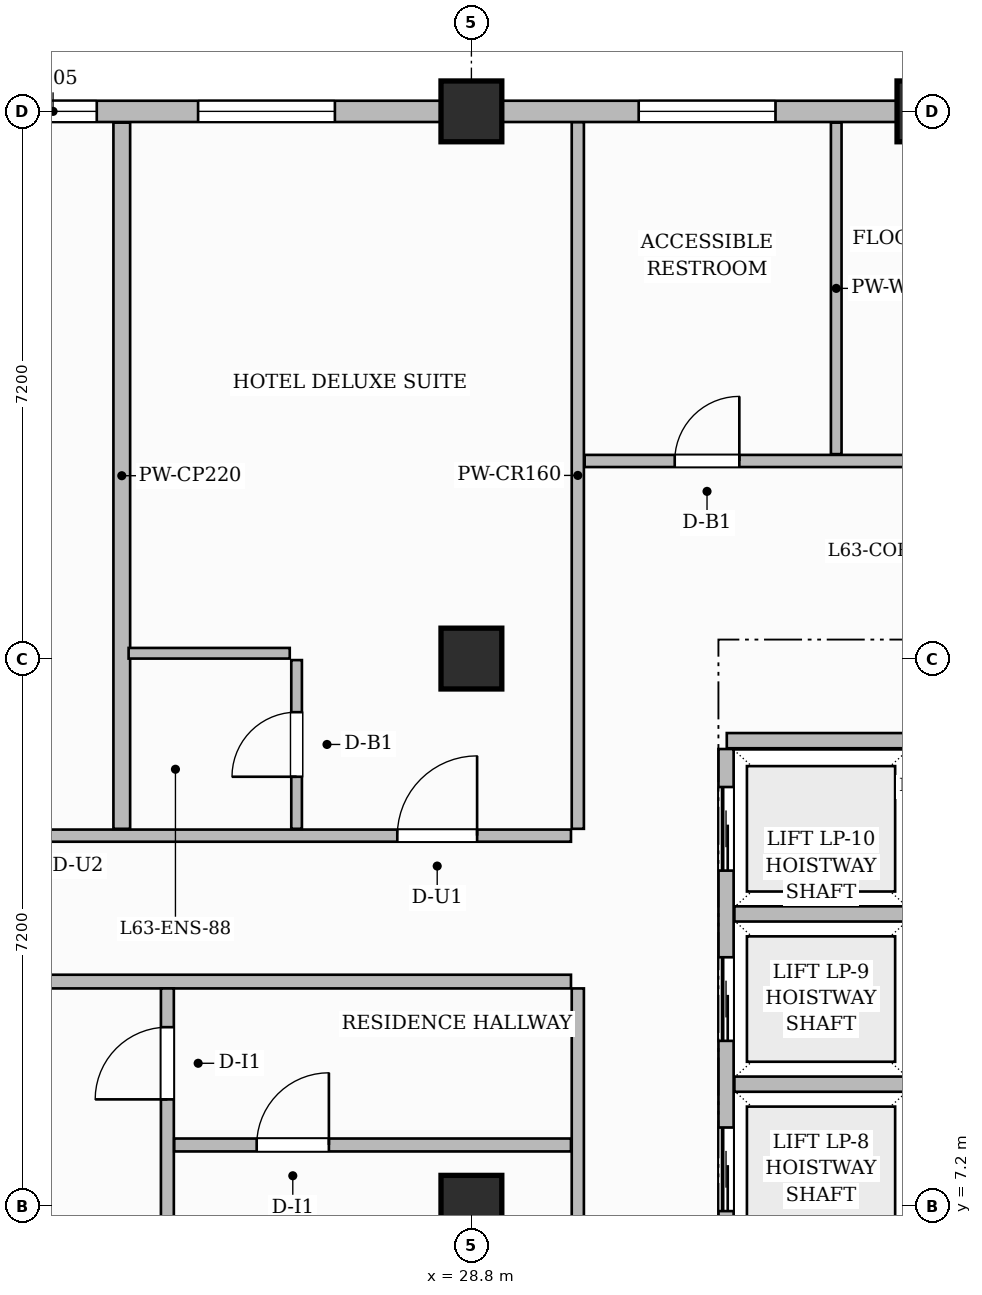
"""IFC4 building model, lengths in metres.
Left out: names, types, materials, properties, quantities, classifications, styles, units other than length and angle.
Written with IfcOpenShell. Run it as: python <this file> out.ifc"""

import sys

from ifc_helpers import new_model, si_unit, direction, frame, frame_2d, origin, origin_2d, place, context, subcontext, project, spatial, rectangle, extrude, source, transform, mapped, element, fill, save


model = new_model("IFC4")
c1 = context("Model", 3, precision=1e-05, world=origin(), true_north=direction((0.0, 1.0)))
c2 = subcontext(c1, "Body", "Model", "MODEL_VIEW")
j1 = project(units=[si_unit("LENGTHUNIT", "METRE"), si_unit("PLANEANGLEUNIT", "RADIAN")], contexts=[c1])
p1 = place(None, origin())
s1 = spatial("IfcSite", under=j1, at=p1, CompositionType="ELEMENT")
p2 = place(p1, origin())
s2 = spatial("IfcBuilding", under=s1, at=p2, CompositionType="ELEMENT")
p3 = place(p2, frame((0.0, 0.0, 251.95)))
s3 = spatial("IfcBuildingStorey", under=s2, at=p3, CompositionType="ELEMENT", Elevation=251.95)
m1 = source(origin(), c2, "Body", "SweptSolid", [
    extrude(rectangle(XDim=0.8, YDim=0.8, at=origin_2d()), origin(), (0.0, 0.0, 1.0), 3.85),
])
for number, where, z_axis, x_axis in (
    (1, (28.8, 7.2, 0.0), (0.0, 0.0, 1.0), (1.0, 0.0, 0.0)),
    (2, (28.8, 14.4, 0.0), (0.0, 0.0, 1.0), (1.0, 0.0, 0.0)),
    (3, (28.8, 21.6, 0.0), (0.0, 0.0, 1.0), (1.0, 0.0, 0.0)),
    (4, (34.8, 21.6, 0.0), (0.0, 0.0, 1.0), (1.0, 0.0, 0.0)),
):
    element("IfcColumn", number, at=place(p3, frame(where, z_axis=z_axis, x_axis=x_axis)), inside=s3, PredefinedType="COLUMN", context=c2, shape_type="MappedRepresentation", body=[
        mapped(m1, transform((0.0, 0.0, 0.0), scale=1.0)),
    ])
p4 = place(p3, frame((32.16, 13.32, 0.0), z_axis=(0.0, 0.0, 1.0), x_axis=(1.0, 0.0, 0.0)))
e5 = element("IfcWall", 5, at=p4, inside=s3, PredefinedType="PARTITIONING", context=c2, shape_type="SweptSolid", body=[
    extrude(rectangle(XDim=2.385, YDim=0.2, at=frame_2d((1.192, 0.0))), origin(), (0.0, 0.0, 1.0), 3.6),
])
p5 = place(p3, frame((32.15, 4.39, 0.0), z_axis=(0.0, 0.0, 1.0), x_axis=(0.0, 1.0, 0.0)))
e6 = element("IfcWall", 6, at=p5, inside=s3, PredefinedType="PARTITIONING", context=c2, shape_type="SweptSolid", body=[
    extrude(rectangle(XDim=8.82, YDim=0.2, at=frame_2d((4.41, 0.0))), origin(), (0.0, 0.0, 1.0), 3.6),
])
p6 = place(p5, frame((0.5, 0.0, 0.0)))
e7 = element("IfcOpeningElement", 7, at=p6, cuts=e6, PredefinedType="OPENING", context=c2, shape_type="SweptSolid", body=[
    extrude(rectangle(XDim=1.1, YDim=2.2, at=frame_2d((0.55, 1.1))), frame((0.0, 0.11, 0.0), z_axis=(0.0, -1.0, 0.0), x_axis=(1.0, 0.0, 0.0)), (0.0, 0.0, 1.0), 0.22),
])
p7 = place(p5, frame((2.74, 0.0, 0.0)))
e8 = element("IfcOpeningElement", 8, at=p7, cuts=e6, PredefinedType="OPENING", context=c2, shape_type="SweptSolid", body=[
    extrude(rectangle(XDim=1.1, YDim=2.2, at=frame_2d((0.55, 1.1))), frame((0.0, 0.11, 0.0), z_axis=(0.0, -1.0, 0.0), x_axis=(1.0, 0.0, 0.0)), (0.0, 0.0, 1.0), 0.22),
])
p8 = place(p5, frame((4.98, 0.0, 0.0)))
e9 = element("IfcOpeningElement", 9, at=p8, cuts=e6, PredefinedType="OPENING", context=c2, shape_type="SweptSolid", body=[
    extrude(rectangle(XDim=1.1, YDim=2.2, at=frame_2d((0.55, 1.1))), frame((0.0, 0.11, 0.0), z_axis=(0.0, -1.0, 0.0), x_axis=(1.0, 0.0, 0.0)), (0.0, 0.0, 1.0), 0.22),
])
p9 = place(p5, frame((7.22, 0.0, 0.0)))
e10 = element("IfcOpeningElement", 10, at=p9, cuts=e6, PredefinedType="OPENING", context=c2, shape_type="SweptSolid", body=[
    extrude(rectangle(XDim=1.1, YDim=2.2, at=frame_2d((0.55, 1.1))), frame((0.0, 0.11, 0.0), z_axis=(0.0, -1.0, 0.0), x_axis=(1.0, 0.0, 0.0)), (0.0, 0.0, 1.0), 0.22),
])
for number, where, z_axis, x_axis in (
    (11, (32.26, 8.8, 0.0), (0.0, 0.0, 1.0), (1.0, 0.0, 0.0)),
    (12, (32.26, 11.04, 0.0), (0.0, 0.0, 1.0), (1.0, 0.0, 0.0)),
):
    element("IfcWall", number, at=place(p3, frame(where, z_axis=z_axis, x_axis=x_axis)), inside=s3, PredefinedType="PARTITIONING", context=c2, shape_type="SweptSolid", body=[
        extrude(rectangle(XDim=2.255, YDim=0.2, at=frame_2d((1.127, 0.0))), origin(), (0.0, 0.0, 1.0), 3.6),
    ])
p10 = place(p3, frame((18.148, 10.15, 0.0), z_axis=(0.0, 0.0, 1.0), x_axis=(1.0, 0.0, 0.0)))
e13 = element("IfcWall", 13, at=p10, inside=s3, PredefinedType="PARTITIONING", context=c2, shape_type="SweptSolid", body=[
    extrude(rectangle(XDim=11.962, YDim=0.18, at=frame_2d((5.981, 0.0))), origin(), (0.0, 0.0, 1.0), 3.6),
])
p11 = place(p10, frame((3.942, 0.0, 0.0)))
e14 = element("IfcOpeningElement", 14, at=p11, cuts=e13, PredefinedType="OPENING", context=c2, shape_type="SweptSolid", body=[
    extrude(rectangle(XDim=1.05, YDim=2.25, at=frame_2d((0.525, 1.125))), frame((0.0, 0.1, 0.0), z_axis=(0.0, -1.0, 0.0), x_axis=(1.0, 0.0, 0.0)), (0.0, 0.0, 1.0), 0.2),
])
p12 = place(p3, frame((18.148, 12.07, 0.0), z_axis=(0.0, 0.0, 1.0), x_axis=(1.0, 0.0, 0.0)))
e15 = element("IfcWall", 15, at=p12, inside=s3, PredefinedType="PARTITIONING", context=c2, shape_type="SweptSolid", body=[
    extrude(rectangle(XDim=11.962, YDim=0.16, at=frame_2d((5.981, 0.0))), origin(), (0.0, 0.0, 1.0), 3.6),
])
p13 = place(p12, frame((3.677, 0.0, 0.0)))
e16 = element("IfcOpeningElement", 16, at=p13, cuts=e15, PredefinedType="OPENING", context=c2, shape_type="SweptSolid", body=[
    extrude(rectangle(XDim=1.0, YDim=2.2, at=frame_2d((0.5, 1.1))), frame((0.0, 0.09, 0.0), z_axis=(0.0, -1.0, 0.0), x_axis=(1.0, 0.0, 0.0)), (0.0, 0.0, 1.0), 0.18),
])
p14 = place(p12, frame((9.677, 0.0, 0.0)))
e17 = element("IfcOpeningElement", 17, at=p14, cuts=e15, PredefinedType="OPENING", context=c2, shape_type="SweptSolid", body=[
    extrude(rectangle(XDim=1.05, YDim=2.25, at=frame_2d((0.525, 1.125))), frame((0.0, 0.09, 0.0), z_axis=(0.0, -1.0, 0.0), x_axis=(1.0, 0.0, 0.0)), (0.0, 0.0, 1.0), 0.18),
])
p15 = place(p3, frame((30.2, 12.16, 0.0), z_axis=(0.0, 0.0, 1.0), x_axis=(0.0, 1.0, 0.0)))
e18 = element("IfcWall", 18, at=p15, inside=s3, PredefinedType="PARTITIONING", context=c2, shape_type="SweptSolid", body=[
    extrude(rectangle(XDim=9.3, YDim=0.16, at=frame_2d((4.65, 0.0))), origin(), (0.0, 0.0, 1.0), 3.6),
])
p16 = place(p3, frame((30.29, 17.0, 0.0), z_axis=(0.0, 0.0, 1.0), x_axis=(1.0, 0.0, 0.0)))
e19 = element("IfcWall", 19, at=p16, inside=s3, PredefinedType="PARTITIONING", context=c2, shape_type="SweptSolid", body=[
    extrude(rectangle(XDim=19.37, YDim=0.16, at=frame_2d((9.685, 0.0))), origin(), (0.0, 0.0, 1.0), 3.6),
])
p17 = place(p16, frame((1.185, 0.0, 0.0)))
e20 = element("IfcOpeningElement", 20, at=p17, cuts=e19, PredefinedType="OPENING", context=c2, shape_type="SweptSolid", body=[
    extrude(rectangle(XDim=0.85, YDim=2.1, at=frame_2d((0.425, 1.05))), frame((0.0, 0.09, 0.0), z_axis=(0.0, -1.0, 0.0), x_axis=(1.0, 0.0, 0.0)), (0.0, 0.0, 1.0), 0.18),
])
p18 = place(p16, frame((6.66, 0.0, 0.0)))
e21 = element("IfcOpeningElement", 21, at=p18, cuts=e19, PredefinedType="OPENING", context=c2, shape_type="SweptSolid", body=[
    extrude(rectangle(XDim=0.9, YDim=2.15, at=frame_2d((0.45, 1.075))), frame((0.0, 0.09, 0.0), z_axis=(0.0, -1.0, 0.0), x_axis=(1.0, 0.0, 0.0)), (0.0, 0.0, 1.0), 0.18),
])
p19 = place(p16, frame((14.46, 0.0, 0.0)))
e22 = element("IfcOpeningElement", 22, at=p19, cuts=e19, PredefinedType="OPENING", context=c2, shape_type="SweptSolid", body=[
    extrude(rectangle(XDim=1.4, YDim=2.35, at=frame_2d((0.7, 1.175))), frame((0.0, 0.09, 0.0), z_axis=(0.0, -1.0, 0.0), x_axis=(1.0, 0.0, 0.0)), (0.0, 0.0, 1.0), 0.18),
])
p20 = place(p3, frame((30.2, 0.148, 0.0), z_axis=(0.0, 0.0, 1.0), x_axis=(0.0, 1.0, 0.0)))
e23 = element("IfcWall", 23, at=p20, inside=s3, PredefinedType="PARTITIONING", context=c2, shape_type="SweptSolid", body=[
    extrude(rectangle(XDim=9.912, YDim=0.16, at=frame_2d((4.956, 0.0))), origin(), (0.0, 0.0, 1.0), 3.6),
])
p21 = place(p20, frame((1.977, 0.0, 0.0)))
e24 = element("IfcOpeningElement", 24, at=p21, cuts=e23, PredefinedType="OPENING", context=c2, shape_type="SweptSolid", body=[
    extrude(rectangle(XDim=1.05, YDim=2.15, at=frame_2d((0.525, 1.075))), frame((0.0, 0.09, 0.0), z_axis=(0.0, -1.0, 0.0), x_axis=(1.0, 0.0, 0.0)), (0.0, 0.0, 1.0), 0.18),
])
p22 = place(p3, frame((33.6, 17.09, 0.0), z_axis=(0.0, 0.0, 1.0), x_axis=(0.0, 1.0, 0.0)))
e25 = element("IfcWall", 25, at=p22, inside=s3, PredefinedType="PARTITIONING", context=c2, shape_type="SweptSolid", body=[
    extrude(rectangle(XDim=4.362, YDim=0.14, at=frame_2d((2.181, 0.0))), origin(), (0.0, 0.0, 1.0), 3.6),
])
p23 = place(p3, frame((24.8, 0.148, 0.0), z_axis=(0.0, 0.0, 1.0), x_axis=(0.0, 1.0, 0.0)))
e26 = element("IfcWall", 26, at=p23, inside=s3, PredefinedType="PARTITIONING", context=c2, shape_type="SweptSolid", body=[
    extrude(rectangle(XDim=9.912, YDim=0.17, at=frame_2d((4.956, 0.0))), origin(), (0.0, 0.0, 1.0), 3.6),
])
p24 = place(p23, frame((8.452, 0.0, 0.0)))
e27 = element("IfcOpeningElement", 27, at=p24, cuts=e26, PredefinedType="OPENING", context=c2, shape_type="SweptSolid", body=[
    extrude(rectangle(XDim=0.95, YDim=2.15, at=frame_2d((0.475, 1.075))), frame((0.0, 0.095, 0.0), z_axis=(0.0, -1.0, 0.0), x_axis=(1.0, 0.0, 0.0)), (0.0, 0.0, 1.0), 0.19),
])
p25 = place(p3, frame((24.89, 8.0, 0.0), z_axis=(0.0, 0.0, 1.0), x_axis=(1.0, 0.0, 0.0)))
e28 = element("IfcWall", 28, at=p25, inside=s3, PredefinedType="PARTITIONING", context=c2, shape_type="SweptSolid", body=[
    extrude(rectangle(XDim=5.22, YDim=0.17, at=frame_2d((2.61, 0.0))), origin(), (0.0, 0.0, 1.0), 3.6),
])
p26 = place(p25, frame((1.085, 0.0, 0.0)))
e29 = element("IfcOpeningElement", 29, at=p26, cuts=e28, PredefinedType="OPENING", context=c2, shape_type="SweptSolid", body=[
    extrude(rectangle(XDim=0.95, YDim=2.15, at=frame_2d((0.475, 1.075))), frame((0.0, 0.095, 0.0), z_axis=(0.0, -1.0, 0.0), x_axis=(1.0, 0.0, 0.0)), (0.0, 0.0, 1.0), 0.19),
])
p27 = place(p3, frame((24.2, 12.16, 0.0), z_axis=(0.0, 0.0, 1.0), x_axis=(0.0, 1.0, 0.0)))
e30 = element("IfcWall", 30, at=p27, inside=s3, PredefinedType="PARTITIONING", context=c2, shape_type="SweptSolid", body=[
    extrude(rectangle(XDim=9.292, YDim=0.22, at=frame_2d((4.646, 0.0))), origin(), (0.0, 0.0, 1.0), 3.6),
])
p28 = place(p3, frame((26.5, 12.16, 0.0), z_axis=(0.0, 0.0, 1.0), x_axis=(0.0, 1.0, 0.0)))
e31 = element("IfcWall", 31, at=p28, inside=s3, PredefinedType="PARTITIONING", context=c2, shape_type="SweptSolid", body=[
    extrude(rectangle(XDim=2.22, YDim=0.14, at=frame_2d((1.11, 0.0))), origin(), (0.0, 0.0, 1.0), 3.6),
])
p29 = place(p28, frame((0.685, 0.0, 0.0)))
e32 = element("IfcOpeningElement", 32, at=p29, cuts=e31, PredefinedType="OPENING", context=c2, shape_type="SweptSolid", body=[
    extrude(rectangle(XDim=0.85, YDim=2.1, at=frame_2d((0.425, 1.05))), frame((0.0, 0.08, 0.0), z_axis=(0.0, -1.0, 0.0), x_axis=(1.0, 0.0, 0.0)), (0.0, 0.0, 1.0), 0.16),
])
p30 = place(p3, frame((24.29, 14.47, 0.0), z_axis=(0.0, 0.0, 1.0), x_axis=(1.0, 0.0, 0.0)))
e33 = element("IfcWall", 33, at=p30, inside=s3, PredefinedType="PARTITIONING", context=c2, shape_type="SweptSolid", body=[
    extrude(rectangle(XDim=2.12, YDim=0.14, at=frame_2d((1.06, 0.0))), origin(), (0.0, 0.0, 1.0), 3.135),
])
p31 = place(p3, frame((18.0, 21.6, 0.0), z_axis=(0.0, 0.0, 1.0), x_axis=(1.0, 0.0, 0.0)))
e34 = element("IfcWall", 34, at=p31, inside=s3, PredefinedType="SOLIDWALL", context=c2, shape_type="SweptSolid", body=[
    extrude(rectangle(XDim=31.8, YDim=0.28, at=frame_2d((15.9, 0.0))), origin(), (0.0, 0.0, 1.0), 3.135),
])
p32 = place(p31, frame((0.885, 0.0, 0.8)))
e35 = element("IfcOpeningElement", 35, at=p32, cuts=e34, PredefinedType="OPENING", context=c2, shape_type="SweptSolid", body=[
    extrude(rectangle(XDim=1.4, YDim=1.85, at=frame_2d((0.7, 0.925))), frame((0.0, 0.15, 0.0), z_axis=(0.0, -1.0, 0.0), x_axis=(1.0, 0.0, 0.0)), (0.0, 0.0, 1.0), 0.3),
])
p33 = place(p31, frame((4.721, 0.0, 0.8)))
e36 = element("IfcOpeningElement", 36, at=p33, cuts=e34, PredefinedType="OPENING", context=c2, shape_type="SweptSolid", body=[
    extrude(rectangle(XDim=1.15, YDim=1.8, at=frame_2d((0.575, 0.9))), frame((0.0, 0.15, 0.0), z_axis=(0.0, -1.0, 0.0), x_axis=(1.0, 0.0, 0.0)), (0.0, 0.0, 1.0), 0.3),
])
p34 = place(p31, frame((7.204, 0.0, 0.8)))
e37 = element("IfcOpeningElement", 37, at=p34, cuts=e34, PredefinedType="OPENING", context=c2, shape_type="SweptSolid", body=[
    extrude(rectangle(XDim=1.8, YDim=1.85, at=frame_2d((0.9, 0.925))), frame((0.0, 0.15, 0.0), z_axis=(0.0, -1.0, 0.0), x_axis=(1.0, 0.0, 0.0)), (0.0, 0.0, 1.0), 0.3),
])
p35 = place(p31, frame((13.001, 0.0, 0.8)))
e38 = element("IfcOpeningElement", 38, at=p35, cuts=e34, PredefinedType="OPENING", context=c2, shape_type="SweptSolid", body=[
    extrude(rectangle(XDim=1.8, YDim=1.85, at=frame_2d((0.9, 0.925))), frame((0.0, 0.15, 0.0), z_axis=(0.0, -1.0, 0.0), x_axis=(1.0, 0.0, 0.0)), (0.0, 0.0, 1.0), 0.3),
])
p36 = place(p31, frame((18.123, 0.0, 0.8)))
e39 = element("IfcOpeningElement", 39, at=p36, cuts=e34, PredefinedType="OPENING", context=c2, shape_type="SweptSolid", body=[
    extrude(rectangle(XDim=1.8, YDim=1.85, at=frame_2d((0.9, 0.925))), frame((0.0, 0.15, 0.0), z_axis=(0.0, -1.0, 0.0), x_axis=(1.0, 0.0, 0.0)), (0.0, 0.0, 1.0), 0.3),
])
p37 = place(p31, frame((20.869, 0.0, 0.8)))
e40 = element("IfcOpeningElement", 40, at=p37, cuts=e34, PredefinedType="OPENING", context=c2, shape_type="SweptSolid", body=[
    extrude(rectangle(XDim=1.8, YDim=1.85, at=frame_2d((0.9, 0.925))), frame((0.0, 0.15, 0.0), z_axis=(0.0, -1.0, 0.0), x_axis=(1.0, 0.0, 0.0)), (0.0, 0.0, 1.0), 0.3),
])
p38 = place(p31, frame((25.475, 0.0, 0.8)))
e41 = element("IfcOpeningElement", 41, at=p38, cuts=e34, PredefinedType="OPENING", context=c2, shape_type="SweptSolid", body=[
    extrude(rectangle(XDim=1.8, YDim=1.85, at=frame_2d((0.9, 0.925))), frame((0.0, 0.15, 0.0), z_axis=(0.0, -1.0, 0.0), x_axis=(1.0, 0.0, 0.0)), (0.0, 0.0, 1.0), 0.3),
])
p39 = place(p31, frame((28.525, 0.0, 0.8)))
e42 = element("IfcOpeningElement", 42, at=p39, cuts=e34, PredefinedType="OPENING", context=c2, shape_type="SweptSolid", body=[
    extrude(rectangle(XDim=1.8, YDim=1.85, at=frame_2d((0.9, 0.925))), frame((0.0, 0.15, 0.0), z_axis=(0.0, -1.0, 0.0), x_axis=(1.0, 0.0, 0.0)), (0.0, 0.0, 1.0), 0.3),
])
m2 = source(origin(), c2, "Body", "SweptSolid", [
    extrude(rectangle(XDim=0.85, YDim=2.1, at=frame_2d((0.425, 1.05))), frame((0.0, 0.025, 0.0), z_axis=(0.0, -1.0, 0.0), x_axis=(1.0, 0.0, 0.0)), (0.0, 0.0, 1.0), 0.05),
])
p40 = place(p17, origin())
e43 = element("IfcDoor", 43, at=p40, inside=s3, OperationType="SINGLE_SWING_RIGHT", PredefinedType="DOOR", context=c2, shape_type="MappedRepresentation", body=[
    mapped(m2, transform((0.0, 0.0, 0.0), scale=1.0)),
])
fill(e20, e43)
m3 = source(origin(), c2, "Body", "SweptSolid", [
    extrude(rectangle(XDim=0.95, YDim=2.15, at=frame_2d((0.475, 1.075))), frame((0.0, 0.025, 0.0), z_axis=(0.0, -1.0, 0.0), x_axis=(1.0, 0.0, 0.0)), (0.0, 0.0, 1.0), 0.05),
])
p41 = place(p24, origin())
e44 = element("IfcDoor", 44, at=p41, inside=s3, OperationType="SINGLE_SWING_LEFT", PredefinedType="DOOR", context=c2, shape_type="MappedRepresentation", body=[
    mapped(m3, transform((0.0, 0.0, 0.0), scale=1.0)),
])
fill(e27, e44)
p42 = place(p26, origin())
e45 = element("IfcDoor", 45, at=p42, inside=s3, OperationType="SINGLE_SWING_RIGHT", PredefinedType="DOOR", context=c2, shape_type="MappedRepresentation", body=[
    mapped(m3, transform((0.0, 0.0, 0.0), scale=1.0)),
])
fill(e29, e45)
p43 = place(p29, origin())
e46 = element("IfcDoor", 46, at=p43, inside=s3, OperationType="SINGLE_SWING_LEFT", PredefinedType="DOOR", context=c2, shape_type="MappedRepresentation", body=[
    mapped(m2, transform((0.0, 0.0, 0.0), scale=1.0)),
])
fill(e32, e46)
m4 = source(origin(), c2, "Body", "SweptSolid", [
    extrude(rectangle(XDim=1.05, YDim=2.25, at=frame_2d((0.525, 1.125))), frame((0.0, 0.025, 0.0), z_axis=(0.0, -1.0, 0.0), x_axis=(1.0, 0.0, 0.0)), (0.0, 0.0, 1.0), 0.05),
])
p44 = place(p14, origin())
e47 = element("IfcDoor", 47, at=p44, inside=s3, OperationType="SINGLE_SWING_RIGHT", PredefinedType="DOOR", context=c2, shape_type="MappedRepresentation", body=[
    mapped(m4, transform((0.0, 0.0, 0.0), scale=1.0)),
])
fill(e17, e47)
m5 = source(origin(), c2, "Body", "SweptSolid", [
    extrude(rectangle(XDim=1.1, YDim=2.2, at=frame_2d((0.55, 1.1))), frame((0.0, 0.025, 0.0), z_axis=(0.0, -1.0, 0.0), x_axis=(1.0, 0.0, 0.0)), (0.0, 0.0, 1.0), 0.05),
])
p45 = place(p7, origin())
e48 = element("IfcDoor", 48, at=p45, inside=s3, OperationType="SLIDING_TO_LEFT", PredefinedType="DOOR", context=c2, shape_type="MappedRepresentation", body=[
    mapped(m5, transform((0.0, 0.0, 0.0), scale=1.0)),
])
fill(e8, e48)
p46 = place(p8, origin())
e49 = element("IfcDoor", 49, at=p46, inside=s3, OperationType="SLIDING_TO_LEFT", PredefinedType="DOOR", context=c2, shape_type="MappedRepresentation", body=[
    mapped(m5, transform((0.0, 0.0, 0.0), scale=1.0)),
])
fill(e9, e49)
p47 = place(p9, origin())
e50 = element("IfcDoor", 50, at=p47, inside=s3, OperationType="SLIDING_TO_LEFT", PredefinedType="DOOR", context=c2, shape_type="MappedRepresentation", body=[
    mapped(m5, transform((0.0, 0.0, 0.0), scale=1.0)),
])
fill(e10, e50)
m6 = source(origin(), c2, "Body", "SweptSolid", [
    extrude(rectangle(XDim=1.15, YDim=1.8, at=frame_2d((0.575, 0.9))), frame((0.0, 0.03, 0.0), z_axis=(0.0, -1.0, 0.0), x_axis=(1.0, 0.0, 0.0)), (0.0, 0.0, 1.0), 0.06),
])
p48 = place(p33, origin())
e51 = element("IfcWindow", 51, at=p48, inside=s3, PartitioningType="SINGLE_PANEL", PredefinedType="WINDOW", context=c2, shape_type="MappedRepresentation", body=[
    mapped(m6, transform((0.0, 0.0, 0.0), scale=1.0)),
])
fill(e36, e51)
m7 = source(origin(), c2, "Body", "SweptSolid", [
    extrude(rectangle(XDim=1.8, YDim=1.85, at=frame_2d((0.9, 0.925))), frame((0.0, 0.03, 0.0), z_axis=(0.0, -1.0, 0.0), x_axis=(1.0, 0.0, 0.0)), (0.0, 0.0, 1.0), 0.06),
])
p49 = place(p34, origin())
e52 = element("IfcWindow", 52, at=p49, inside=s3, PartitioningType="DOUBLE_PANEL_VERTICAL", PredefinedType="WINDOW", context=c2, shape_type="MappedRepresentation", body=[
    mapped(m7, transform((0.0, 0.0, 0.0), scale=1.0)),
])
fill(e37, e52)
p50 = place(p35, origin())
e53 = element("IfcWindow", 53, at=p50, inside=s3, PartitioningType="DOUBLE_PANEL_VERTICAL", PredefinedType="WINDOW", context=c2, shape_type="MappedRepresentation", body=[
    mapped(m7, transform((0.0, 0.0, 0.0), scale=1.0)),
])
fill(e38, e53)
save(model, sys.argv[1])
